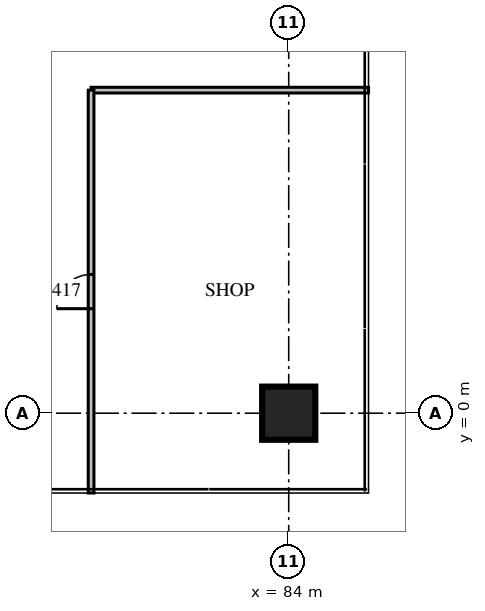
"""IFC4 building model, lengths in metres.
Left out: names, types, materials, properties, quantities, classifications, styles, units other than length and angle.
Written with IfcOpenShell. Run it as: python <this file> out.ifc"""

import sys

from ifc_helpers import new_model, si_unit, direction, frame, frame_2d, origin, origin_2d, place, context, subcontext, project, spatial, rectangle, extrude, source, transform, mapped, element, fill, save


model = new_model("IFC4")
c1 = context("Model", 3, precision=1e-05, world=origin(), true_north=direction((0.0, 1.0)))
c2 = subcontext(c1, "Body", "Model", "MODEL_VIEW")
j1 = project(units=[si_unit("LENGTHUNIT", "METRE"), si_unit("PLANEANGLEUNIT", "RADIAN")], contexts=[c1])
p1 = place(None, origin())
s1 = spatial("IfcSite", under=j1, at=p1, CompositionType="ELEMENT")
p2 = place(p1, origin())
s2 = spatial("IfcBuilding", under=s1, at=p2, CompositionType="ELEMENT")
p3 = place(p2, frame((0.0, 0.0, 7.5)))
s3 = spatial("IfcBuildingStorey", under=s2, at=p3, CompositionType="ELEMENT", Elevation=7.5)
m1 = source(origin(), c2, "Body", "SweptSolid", [
    extrude(rectangle(XDim=1.4, YDim=1.4, at=origin_2d()), origin(), (0.0, 0.0, 1.0), 5.4),
])
p4 = place(p3, frame((84.0, 0.0, 0.0), z_axis=(0.0, 0.0, 1.0), x_axis=(1.0, 0.0, 0.0)))
e1 = element("IfcColumn", 1, at=p4, inside=s3, PredefinedType="COLUMN", context=c2, shape_type="MappedRepresentation", body=[
    mapped(m1, transform((0.0, 0.0, 0.0), scale=1.0)),
])
p5 = place(p3, frame((78.8, 8.5, 0.0), z_axis=(0.0, 0.0, 1.0), x_axis=(1.0, 0.0, 0.0)))
e2 = element("IfcWall", 2, at=p5, inside=s3, PredefinedType="PARTITIONING", context=c2, shape_type="SweptSolid", body=[
    extrude(rectangle(XDim=7.3, YDim=0.15, at=frame_2d((3.65, 0.0))), origin(), (0.0, 0.0, 1.0), 4.8),
])
m2 = source(origin(), c2, "Body", "SweptSolid", [
    extrude(rectangle(XDim=10.6, YDim=0.15, at=frame_2d((5.3, 0.0))), origin(), (0.0, 0.0, 1.0), 4.8),
])
p6 = place(p3, frame((78.8, -2.1, 0.0), z_axis=(0.0, 0.0, 1.0), x_axis=(0.0, 1.0, 0.0)))
e3 = element("IfcWall", 3, at=p6, inside=s3, PredefinedType="PARTITIONING", context=c2, shape_type="MappedRepresentation", body=[
    mapped(m2, transform((0.0, 0.0, 0.0), scale=1.0)),
])
m3 = source(origin(), c2, "Body", "SweptSolid", [
    extrude(rectangle(XDim=0.9, YDim=2.1, at=frame_2d((0.45, 1.05))), frame((0.0, 0.085, 0.0), z_axis=(0.0, -1.0, 0.0), x_axis=(1.0, 0.0, 0.0)), (0.0, 0.0, 1.0), 0.17),
])
p7 = place(p6, frame((4.85, 0.0, 0.0)))
e4 = element("IfcOpeningElement", 4, at=p7, cuts=e3, PredefinedType="OPENING", context=c2, shape_type="MappedRepresentation", body=[
    mapped(m3, transform((0.0, 0.0, 0.0), scale=1.0)),
])
m4 = source(origin(), c2, "Body", "SweptSolid", [
    extrude(rectangle(XDim=0.9, YDim=2.1, at=frame_2d((0.45, 1.05))), frame((0.0, 0.025, 0.0), z_axis=(0.0, -1.0, 0.0), x_axis=(1.0, 0.0, 0.0)), (0.0, 0.0, 1.0), 0.05),
])
p8 = place(p7, origin())
e5 = element("IfcDoor", 5, at=p8, inside=s3, OperationType="SINGLE_SWING_LEFT", PredefinedType="DOOR", context=c2, shape_type="MappedRepresentation", body=[
    mapped(m4, transform((0.0, 0.0, 0.0), scale=1.0)),
])
fill(e4, e5)
save(model, sys.argv[1])
